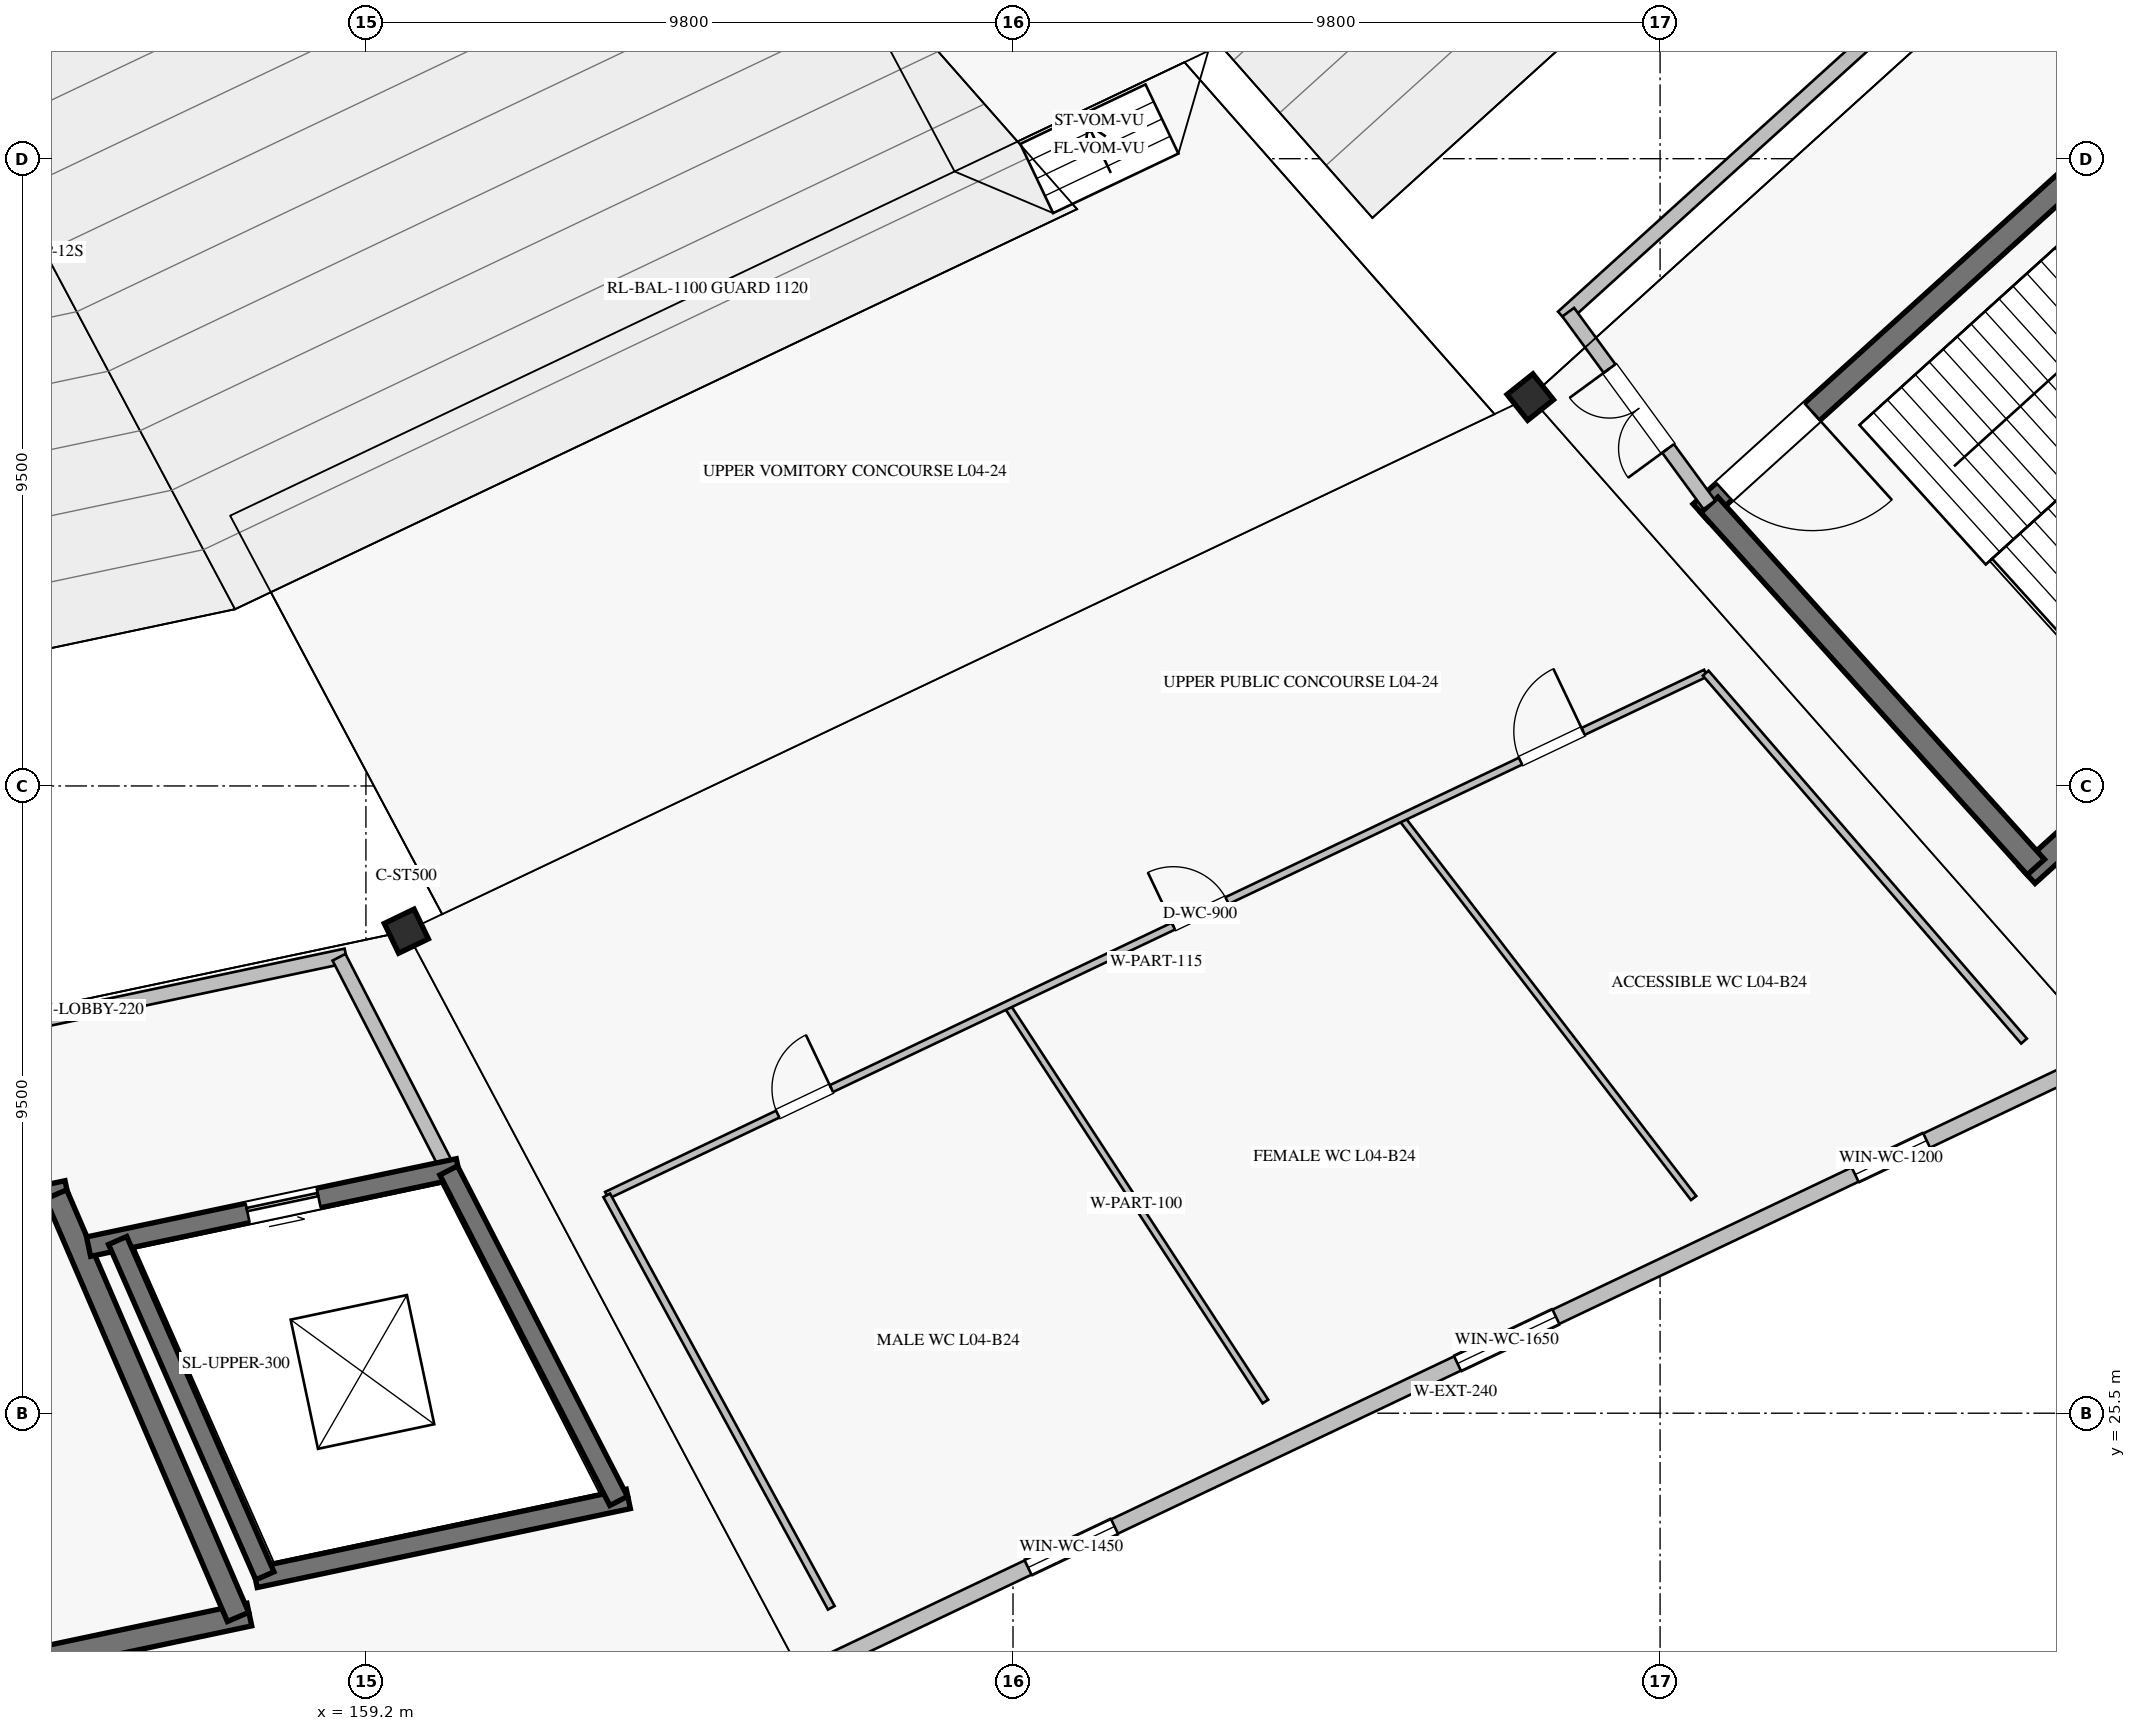
"""IFC4 building model, lengths in metres.
Left out: names, types, materials, properties, quantities, classifications, styles, units other than length and angle.
Written with IfcOpenShell. Run it as: python <this file> out.ifc"""

import sys

from ifc_helpers import new_model, si_unit, direction, frame, frame_2d, origin, origin_2d, place, context, subcontext, project, spatial, rectangle, hollow_rectangle, extrude, element, fill, save


model = new_model("IFC4")
c1 = context("Model", 3, precision=1e-05, world=origin(), true_north=direction((0.0, 1.0)))
c2 = subcontext(c1, "Body", "Model", "MODEL_VIEW")
j1 = project(units=[si_unit("LENGTHUNIT", "METRE"), si_unit("PLANEANGLEUNIT", "RADIAN")], contexts=[c1])
p1 = place(None, origin())
s1 = spatial("IfcSite", under=j1, at=p1, CompositionType="ELEMENT")
p2 = place(p1, origin())
s2 = spatial("IfcBuilding", under=s1, at=p2, CompositionType="ELEMENT")
p3 = place(p2, frame((0.0, 0.0, 20.4)))
s3 = spatial("IfcBuildingStorey", under=s2, at=p3, CompositionType="ELEMENT", Elevation=20.4)
for number, where, z_axis, x_axis in (
    (1, (159.812, 32.801, 0.0), (0.0, 0.0, 1.0), (0.434, -0.901, 0.0)),
    (2, (176.834, 40.889, 0.0), (0.0, 0.0, 1.0), (0.623, -0.782, 0.0)),
):
    element("IfcColumn", number, at=place(p3, frame(where, z_axis=z_axis, x_axis=x_axis)), inside=s3, PredefinedType="COLUMN", context=c2, shape_type="SweptSolid", body=[
        extrude(hollow_rectangle(XDim=0.5, YDim=0.5, WallThickness=0.022, at=origin_2d()), origin(), (0.0, 0.0, 1.0), 5.44),
    ])
p4 = place(p3, frame((166.003, 21.63, 0.0), z_axis=(0.0, 0.0, 1.0), x_axis=(0.90321305417, 0.42919247288, 0.0)))
e3 = element("IfcWall", 3, at=p4, inside=s3, PredefinedType="SOLIDWALL", context=c2, shape_type="SweptSolid", body=[
    extrude(rectangle(XDim=21.474, YDim=0.24, at=frame_2d((10.737, 0.0))), origin(), (0.0, 0.0, 1.0), 4.53),
])
p5 = place(p4, frame((3.57, 0.0, 1.65)))
e4 = element("IfcOpeningElement", 4, at=p5, cuts=e3, PredefinedType="OPENING", context=c2, shape_type="SweptSolid", body=[
    extrude(rectangle(XDim=1.45, YDim=0.95, at=frame_2d((0.725, 0.475))), frame((0.0, 0.13, 0.0), z_axis=(0.0, -1.0, 0.0), x_axis=(1.0, 0.0, 0.0)), (0.0, 0.0, 1.0), 0.26),
])
p6 = place(p4, frame((10.771, 0.0, 1.65)))
e5 = element("IfcOpeningElement", 5, at=p6, cuts=e3, PredefinedType="OPENING", context=c2, shape_type="SweptSolid", body=[
    extrude(rectangle(XDim=1.65, YDim=1.0, at=frame_2d((0.825, 0.5))), frame((0.0, 0.13, 0.0), z_axis=(0.0, -1.0, 0.0), x_axis=(1.0, 0.0, 0.0)), (0.0, 0.0, 1.0), 0.26),
])
p7 = place(p4, frame((17.438, 0.0, 1.65)))
e6 = element("IfcOpeningElement", 6, at=p7, cuts=e3, PredefinedType="OPENING", context=c2, shape_type="SweptSolid", body=[
    extrude(rectangle(XDim=1.2, YDim=0.9, at=frame_2d((0.6, 0.45))), frame((0.0, 0.13, 0.0), z_axis=(0.0, -1.0, 0.0), x_axis=(1.0, 0.0, 0.0)), (0.0, 0.0, 1.0), 0.26),
])
p8 = place(p3, frame((142.896, 26.357, 0.0), z_axis=(0.0, 0.0, 1.0), x_axis=(0.978345203961, 0.206979858648, 0.0)))
e7 = element("IfcWall", 7, at=p8, inside=s3, PredefinedType="SHEAR", context=c2, shape_type="SweptSolid", body=[
    extrude(rectangle(XDim=12.044, YDim=0.35, at=frame_2d((6.022, 0.0))), origin(), (0.0, 0.0, 1.0), 5.18),
])
p9 = place(p8, frame((0.475, 0.0, 0.0)))
e8 = element("IfcOpeningElement", 8, at=p9, cuts=e7, PredefinedType="OPENING", context=c2, shape_type="SweptSolid", body=[
    extrude(rectangle(XDim=1.8, YDim=2.2, at=frame_2d((0.9, 1.1))), frame((0.0, 0.185, 0.0), z_axis=(0.0, -1.0, 0.0), x_axis=(1.0, 0.0, 0.0)), (0.0, 0.0, 1.0), 0.37),
])
p10 = place(p3, frame((144.65, 19.746, 0.0), z_axis=(0.0, 0.0, 1.0), x_axis=(0.978345119536, 0.206980257705, 0.0)))
e9 = element("IfcWall", 9, at=p10, inside=s3, PredefinedType="SHEAR", context=c2, shape_type="SweptSolid", body=[
    extrude(rectangle(XDim=13.067, YDim=0.35, at=frame_2d((6.533, 0.0))), origin(), (0.0, 0.0, 1.0), 5.18),
])
p11 = place(p3, frame((154.508, 28.814, 0.0), z_axis=(0.0, 0.0, 1.0), x_axis=(0.395453834155, -0.918485854574, 0.0)))
e10 = element("IfcWall", 10, at=p11, inside=s3, PredefinedType="SHEAR", context=c2, shape_type="SweptSolid", body=[
    extrude(rectangle(XDim=6.968, YDim=0.35, at=frame_2d((3.484, 0.0))), origin(), (0.0, 0.0, 1.0), 5.18),
])
p12 = place(p3, frame((154.999, 28.023, 0.0), z_axis=(0.0, 0.0, 1.0), x_axis=(0.978345218992, 0.206979787601, 0.0)))
e11 = element("IfcWall", 11, at=p12, inside=s3, PredefinedType="SHEAR", context=c2, shape_type="SweptSolid", body=[
    extrude(rectangle(XDim=5.724, YDim=0.3, at=frame_2d((2.862, 0.0))), origin(), (0.0, 0.0, 1.0), 5.18),
])
p13 = place(p12, frame((2.462, 0.0, 0.0)))
e12 = element("IfcOpeningElement", 12, at=p13, cuts=e11, PredefinedType="OPENING", context=c2, shape_type="SweptSolid", body=[
    extrude(rectangle(XDim=1.1, YDim=2.2, at=frame_2d((0.55, 1.1))), frame((0.0, 0.16, 0.0), z_axis=(0.0, -1.0, 0.0), x_axis=(1.0, 0.0, 0.0)), (0.0, 0.0, 1.0), 0.32),
])
p14 = place(p3, frame((157.523, 23.006, 0.0), z_axis=(0.0, 0.0, 1.0), x_axis=(0.978347069901, 0.206971038591, 0.0)))
e13 = element("IfcWall", 13, at=p14, inside=s3, PredefinedType="SHEAR", context=c2, shape_type="SweptSolid", body=[
    extrude(rectangle(XDim=5.776, YDim=0.3, at=frame_2d((2.888, 0.0))), origin(), (0.0, 0.0, 1.0), 5.18),
])
p15 = place(p3, frame((155.44, 28.116, 0.0), z_axis=(0.0, 0.0, 1.0), x_axis=(0.402005363577, -0.915637312289, 0.0)))
e14 = element("IfcWall", 14, at=p15, inside=s3, PredefinedType="SHEAR", context=c2, shape_type="SweptSolid", body=[
    extrude(rectangle(XDim=5.547, YDim=0.3, at=frame_2d((2.773, 0.0))), origin(), (0.0, 0.0, 1.0), 5.18),
])
p16 = place(p3, frame((160.453, 29.177, 0.0), z_axis=(0.0, 0.0, 1.0), x_axis=(0.457368592987, -0.889277217829, 0.0)))
e15 = element("IfcWall", 15, at=p16, inside=s3, PredefinedType="SHEAR", context=c2, shape_type="SweptSolid", body=[
    extrude(rectangle(XDim=5.629, YDim=0.3, at=frame_2d((2.814, 0.0))), origin(), (0.0, 0.0, 1.0), 5.18),
])
p17 = place(p3, frame((142.284, 28.914, 0.0), z_axis=(0.0, 0.0, 1.0), x_axis=(0.97834522483, 0.206979760008, 0.0)))
e16 = element("IfcWall", 16, at=p17, inside=s3, PredefinedType="SOLIDWALL", context=c2, shape_type="SweptSolid", body=[
    extrude(rectangle(XDim=16.983, YDim=0.22, at=frame_2d((8.491, 0.0))), origin(), (0.0, 0.0, 1.0), 5.18),
])
p18 = place(p3, frame((158.792, 32.406, 0.0), z_axis=(0.0, 0.0, 1.0), x_axis=(0.457349531643, -0.889287021105, 0.0)))
e17 = element("IfcWall", 17, at=p18, inside=s3, PredefinedType="SOLIDWALL", context=c2, shape_type="SweptSolid", body=[
    extrude(rectangle(XDim=3.632, YDim=0.22, at=frame_2d((1.816, 0.0))), origin(), (0.0, 0.0, 1.0), 5.18),
])
p19 = place(p3, frame((179.417, 39.14, 0.0), z_axis=(0.0, 0.0, 1.0), x_axis=(0.741348929385, 0.671119784315, 0.0)))
e18 = element("IfcWall", 18, at=p19, inside=s3, PredefinedType="SHEAR", context=c2, shape_type="SweptSolid", body=[
    extrude(rectangle(XDim=11.826, YDim=0.35, at=frame_2d((5.913, 0.0))), origin(), (0.0, 0.0, 1.0), 5.18),
])
p20 = place(p19, frame((0.475, 0.0, 0.0)))
e19 = element("IfcOpeningElement", 19, at=p20, cuts=e18, PredefinedType="OPENING", context=c2, shape_type="SweptSolid", body=[
    extrude(rectangle(XDim=1.8, YDim=2.2, at=frame_2d((0.9, 1.1))), frame((0.0, 0.185, 0.0), z_axis=(0.0, -1.0, 0.0), x_axis=(1.0, 0.0, 0.0)), (0.0, 0.0, 1.0), 0.37),
])
p21 = place(p3, frame((184.361, 33.653, 0.0), z_axis=(0.0, 0.0, 1.0), x_axis=(0.741351373721, 0.671117084183, 0.0)))
e20 = element("IfcWall", 20, at=p21, inside=s3, PredefinedType="SHEAR", context=c2, shape_type="SweptSolid", body=[
    extrude(rectangle(XDim=12.83, YDim=0.35, at=frame_2d((6.415, 0.0))), origin(), (0.0, 0.0, 1.0), 5.18),
])
p22 = place(p3, frame((179.546, 39.257, 0.0), z_axis=(0.0, 0.0, 1.0), x_axis=(0.669463145673, -0.742845270958, 0.0)))
e21 = element("IfcWall", 21, at=p22, inside=s3, PredefinedType="SHEAR", context=c2, shape_type="SweptSolid", body=[
    extrude(rectangle(XDim=7.386, YDim=0.35, at=frame_2d((3.693, 0.0))), origin(), (0.0, 0.0, 1.0), 5.18),
])
p23 = place(p3, frame((177.327, 42.102, 0.0), z_axis=(0.0, 0.0, 1.0), x_axis=(0.741351035574, 0.671117457717, 0.0)))
e22 = element("IfcWall", 22, at=p23, inside=s3, PredefinedType="SOLIDWALL", context=c2, shape_type="SweptSolid", body=[
    extrude(rectangle(XDim=15.969, YDim=0.22, at=frame_2d((7.985, 0.0))), origin(), (0.0, 0.0, 1.0), 5.18),
])
p24 = place(p3, frame((177.409, 42.176, 0.0), z_axis=(0.0, 0.0, 1.0), x_axis=(0.590836915359, -0.806791013491, 0.0)))
e23 = element("IfcWall", 23, at=p24, inside=s3, PredefinedType="SOLIDWALL", context=c2, shape_type="SweptSolid", body=[
    extrude(rectangle(XDim=3.618, YDim=0.22, at=frame_2d((1.809, 0.0))), origin(), (0.0, 0.0, 1.0), 5.18),
])
p25 = place(p24, frame((1.059, 0.0, 0.0)))
e24 = element("IfcOpeningElement", 24, at=p25, cuts=e23, PredefinedType="OPENING", context=c2, shape_type="SweptSolid", body=[
    extrude(rectangle(XDim=1.5, YDim=2.2, at=frame_2d((0.75, 1.1))), frame((0.0, 0.12, 0.0), z_axis=(0.0, -1.0, 0.0), x_axis=(1.0, 0.0, 0.0)), (0.0, 0.0, 1.0), 0.24),
])
p26 = place(p3, frame((162.847, 28.8, 0.0), z_axis=(0.0, 0.0, 1.0), x_axis=(0.90321677741, 0.429184637429, 0.0)))
e25 = element("IfcWall", 25, at=p26, inside=s3, PredefinedType="PARTITIONING", context=c2, shape_type="SweptSolid", body=[
    extrude(rectangle(XDim=18.427, YDim=0.115, at=frame_2d((9.214, 0.0))), origin(), (0.0, 0.0, 1.0), 4.5),
])
p27 = place(p26, frame((2.867, 0.0, 0.0)))
e26 = element("IfcOpeningElement", 26, at=p27, cuts=e25, PredefinedType="OPENING", context=c2, shape_type="SweptSolid", body=[
    extrude(rectangle(XDim=0.9, YDim=2.1, at=frame_2d((0.45, 1.05))), frame((0.0, 0.067, 0.0), z_axis=(0.0, -1.0, 0.0), x_axis=(1.0, 0.0, 0.0)), (0.0, 0.0, 1.0), 0.135),
])
p28 = place(p26, frame((9.501, 0.0, 0.0)))
e27 = element("IfcOpeningElement", 27, at=p28, cuts=e25, PredefinedType="OPENING", context=c2, shape_type="SweptSolid", body=[
    extrude(rectangle(XDim=0.9, YDim=2.1, at=frame_2d((0.45, 1.05))), frame((0.0, 0.067, 0.0), z_axis=(0.0, -1.0, 0.0), x_axis=(1.0, 0.0, 0.0)), (0.0, 0.0, 1.0), 0.135),
])
p29 = place(p26, frame((15.322, 0.0, 0.0)))
e28 = element("IfcOpeningElement", 28, at=p29, cuts=e25, PredefinedType="OPENING", context=c2, shape_type="SweptSolid", body=[
    extrude(rectangle(XDim=1.05, YDim=2.1, at=frame_2d((0.525, 1.05))), frame((0.0, 0.067, 0.0), z_axis=(0.0, -1.0, 0.0), x_axis=(1.0, 0.0, 0.0)), (0.0, 0.0, 1.0), 0.135),
])
p30 = place(p3, frame((162.847, 28.8, 0.0), z_axis=(0.0, 0.0, 1.0), x_axis=(0.47812325427, -0.878292749444, 0.0)))
e29 = element("IfcWall", 29, at=p30, inside=s3, PredefinedType="PARTITIONING", context=c2, shape_type="SweptSolid", body=[
    extrude(rectangle(XDim=7.113, YDim=0.115, at=frame_2d((3.556, 0.0))), origin(), (0.0, 0.0, 1.0), 4.5),
])
p31 = place(p3, frame((179.491, 36.708, 0.0), z_axis=(0.0, 0.0, 1.0), x_axis=(0.654288201841, -0.7562452968, 0.0)))
e30 = element("IfcWall", 30, at=p31, inside=s3, PredefinedType="PARTITIONING", context=c2, shape_type="SweptSolid", body=[
    extrude(rectangle(XDim=7.368, YDim=0.115, at=frame_2d((3.684, 0.0))), origin(), (0.0, 0.0, 1.0), 4.5),
])
p32 = place(p3, frame((168.906, 31.678, 0.0), z_axis=(0.0, 0.0, 1.0), x_axis=(0.546624159771, -0.837378067515, 0.0)))
e31 = element("IfcWall", 31, at=p32, inside=s3, PredefinedType="PARTITIONING", context=c2, shape_type="SweptSolid", body=[
    extrude(rectangle(XDim=7.167, YDim=0.1, at=frame_2d((3.583, 0.0))), origin(), (0.0, 0.0, 1.0), 4.5),
])
p33 = place(p3, frame((174.881, 34.518, 0.0), z_axis=(0.0, 0.0, 1.0), x_axis=(0.609491469693, -0.792792626335, 0.0)))
e32 = element("IfcWall", 32, at=p33, inside=s3, PredefinedType="PARTITIONING", context=c2, shape_type="SweptSolid", body=[
    extrude(rectangle(XDim=7.264, YDim=0.1, at=frame_2d((3.632, 0.0))), origin(), (0.0, 0.0, 1.0), 4.5),
])
p34 = place(p5, origin())
e33 = element("IfcWindow", 33, at=p34, inside=s3, PartitioningType="SINGLE_PANEL", PredefinedType="WINDOW", context=c2, shape_type="SweptSolid", body=[
    extrude(rectangle(XDim=1.45, YDim=0.95, at=frame_2d((0.725, 0.475))), frame((0.0, 0.03, 0.0), z_axis=(0.0, -1.0, 0.0), x_axis=(1.0, 0.0, 0.0)), (0.0, 0.0, 1.0), 0.06),
])
fill(e4, e33)
p35 = place(p6, origin())
e34 = element("IfcWindow", 34, at=p35, inside=s3, PartitioningType="SINGLE_PANEL", PredefinedType="WINDOW", context=c2, shape_type="SweptSolid", body=[
    extrude(rectangle(XDim=1.65, YDim=1.0, at=frame_2d((0.825, 0.5))), frame((0.0, 0.03, 0.0), z_axis=(0.0, -1.0, 0.0), x_axis=(1.0, 0.0, 0.0)), (0.0, 0.0, 1.0), 0.06),
])
fill(e5, e34)
p36 = place(p7, origin())
e35 = element("IfcWindow", 35, at=p36, inside=s3, PartitioningType="SINGLE_PANEL", PredefinedType="WINDOW", context=c2, shape_type="SweptSolid", body=[
    extrude(rectangle(XDim=1.2, YDim=0.9, at=frame_2d((0.6, 0.45))), frame((0.0, 0.03, 0.0), z_axis=(0.0, -1.0, 0.0), x_axis=(1.0, 0.0, 0.0)), (0.0, 0.0, 1.0), 0.06),
])
fill(e6, e35)
p37 = place(p13, origin())
e36 = element("IfcDoor", 36, at=p37, inside=s3, OperationType="SLIDING_TO_RIGHT", PredefinedType="DOOR", context=c2, shape_type="SweptSolid", body=[
    extrude(rectangle(XDim=1.1, YDim=2.2, at=frame_2d((0.55, 1.1))), frame((0.0, 0.025, 0.0), z_axis=(0.0, -1.0, 0.0), x_axis=(1.0, 0.0, 0.0)), (0.0, 0.0, 1.0), 0.05),
])
fill(e12, e36)
p38 = place(p20, frame((1.8, 0.0, 0.0), z_axis=(0.0, 0.0, 1.0), x_axis=(-1.0, 0.0, 0.0)))
e37 = element("IfcDoor", 37, at=p38, inside=s3, OperationType="SINGLE_SWING_LEFT", PredefinedType="DOOR", context=c2, shape_type="SweptSolid", body=[
    extrude(rectangle(XDim=1.8, YDim=2.2, at=frame_2d((0.9, 1.1))), frame((0.0, 0.025, 0.0), z_axis=(0.0, -1.0, 0.0), x_axis=(1.0, 0.0, 0.0)), (0.0, 0.0, 1.0), 0.05),
])
fill(e19, e37)
p39 = place(p25, frame((1.5, 0.0, 0.0), z_axis=(0.0, 0.0, 1.0), x_axis=(-1.0, 0.0, 0.0)))
e38 = element("IfcDoor", 38, at=p39, inside=s3, OperationType="DOUBLE_DOOR_SINGLE_SWING", PredefinedType="DOOR", context=c2, shape_type="SweptSolid", body=[
    extrude(rectangle(XDim=1.5, YDim=2.2, at=frame_2d((0.75, 1.1))), frame((0.0, 0.025, 0.0), z_axis=(0.0, -1.0, 0.0), x_axis=(1.0, 0.0, 0.0)), (0.0, 0.0, 1.0), 0.05),
])
fill(e24, e38)
p40 = place(p27, origin())
e39 = element("IfcDoor", 39, at=p40, inside=s3, OperationType="SINGLE_SWING_RIGHT", PredefinedType="DOOR", context=c2, shape_type="SweptSolid", body=[
    extrude(rectangle(XDim=0.9, YDim=2.1, at=frame_2d((0.45, 1.05))), frame((0.0, 0.025, 0.0), z_axis=(0.0, -1.0, 0.0), x_axis=(1.0, 0.0, 0.0)), (0.0, 0.0, 1.0), 0.05),
])
fill(e26, e39)
p41 = place(p28, origin())
e40 = element("IfcDoor", 40, at=p41, inside=s3, OperationType="SINGLE_SWING_LEFT", PredefinedType="DOOR", context=c2, shape_type="SweptSolid", body=[
    extrude(rectangle(XDim=0.9, YDim=2.1, at=frame_2d((0.45, 1.05))), frame((0.0, 0.025, 0.0), z_axis=(0.0, -1.0, 0.0), x_axis=(1.0, 0.0, 0.0)), (0.0, 0.0, 1.0), 0.05),
])
fill(e27, e40)
p42 = place(p29, origin())
e41 = element("IfcDoor", 41, at=p42, inside=s3, OperationType="SINGLE_SWING_RIGHT", PredefinedType="DOOR", context=c2, shape_type="SweptSolid", body=[
    extrude(rectangle(XDim=1.05, YDim=2.1, at=frame_2d((0.525, 1.05))), frame((0.0, 0.025, 0.0), z_axis=(0.0, -1.0, 0.0), x_axis=(1.0, 0.0, 0.0)), (0.0, 0.0, 1.0), 0.05),
])
fill(e28, e41)
save(model, sys.argv[1])
